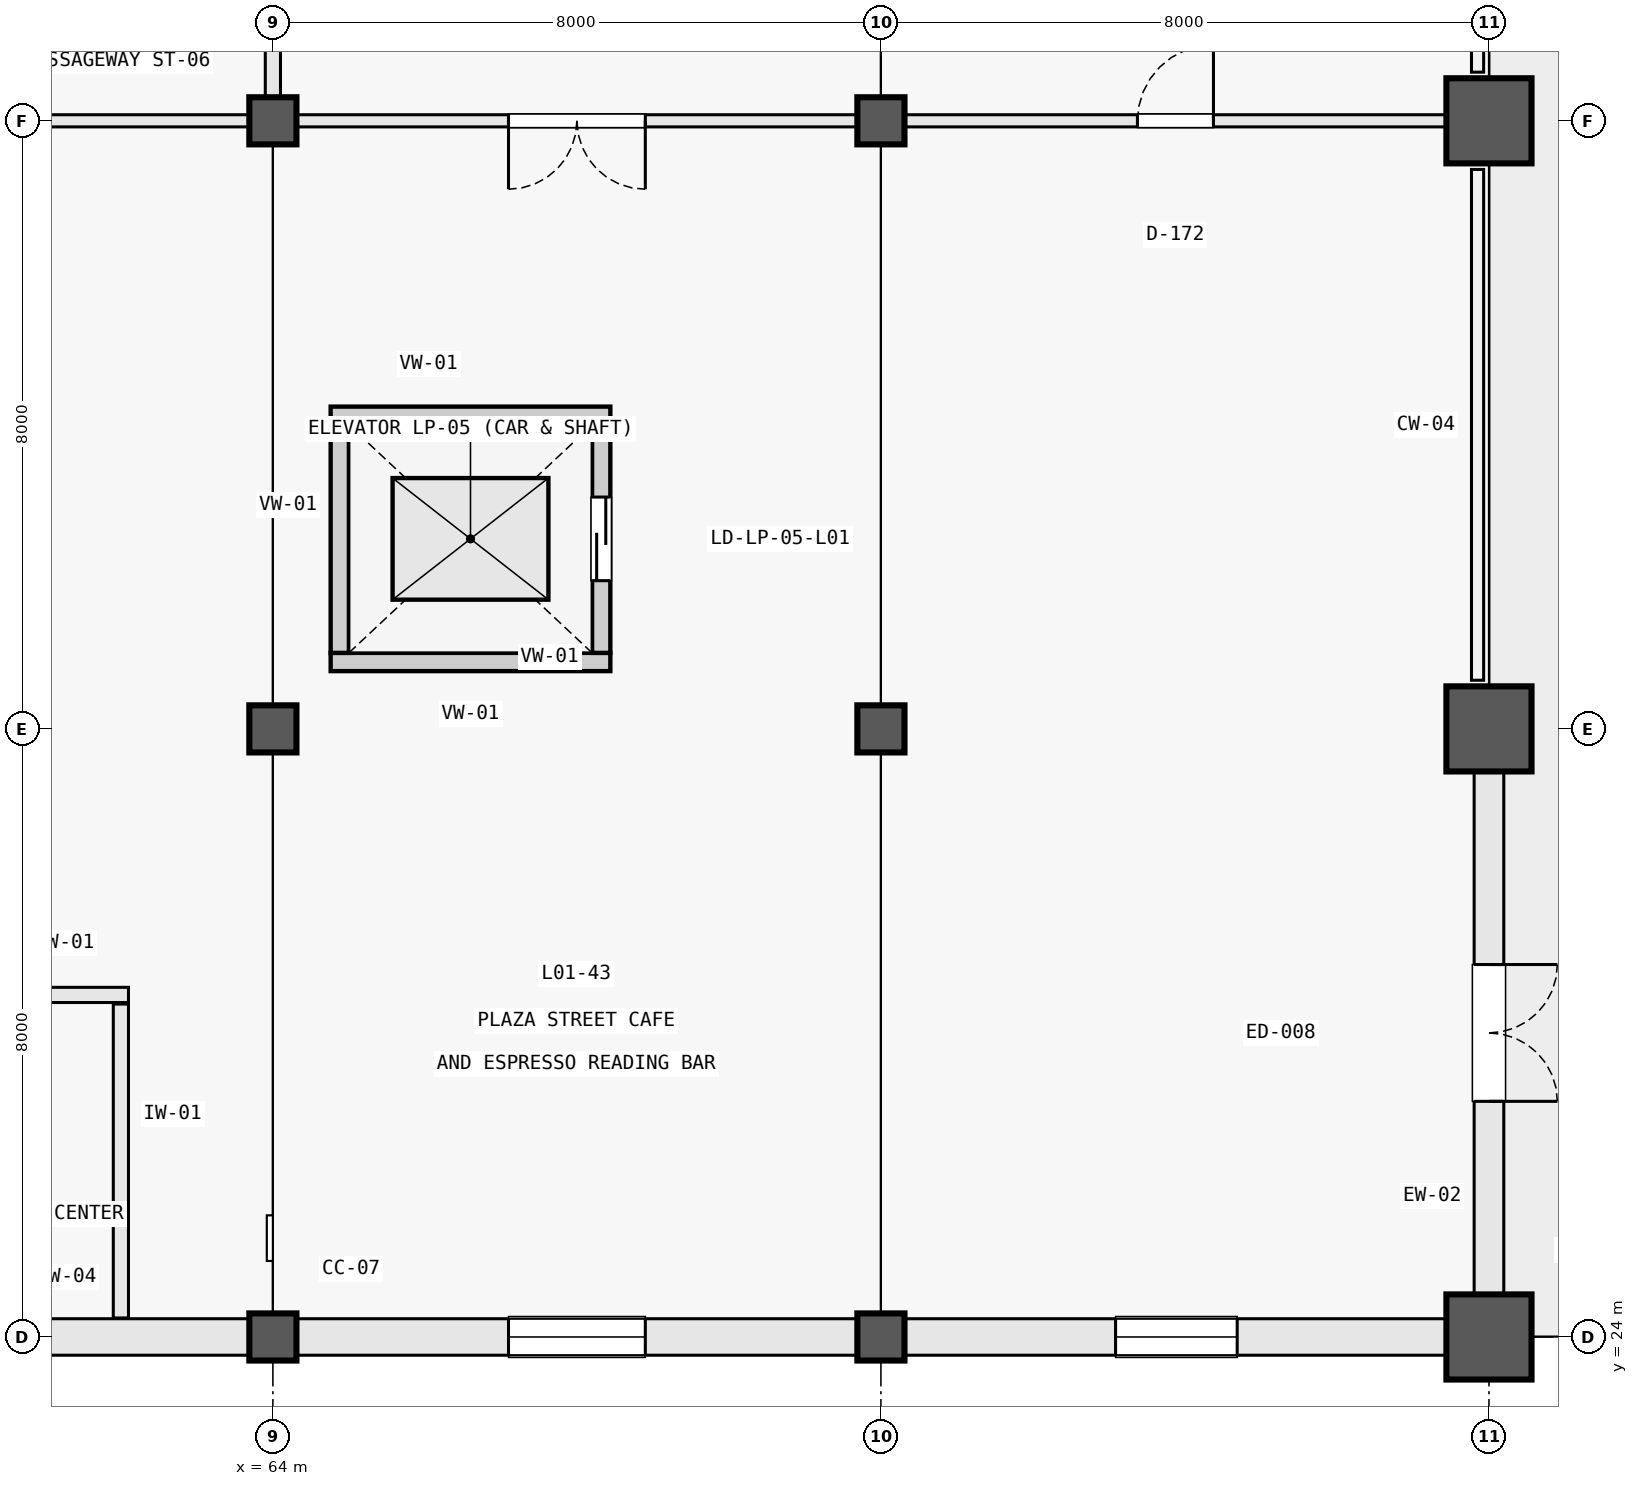
"""IFC4 building model, lengths in metres.
Left out: names, types, materials, properties, quantities, classifications, styles, units other than length and angle.
Written with IfcOpenShell. Run it as: python <this file> out.ifc"""

import sys

from ifc_helpers import new_model, si_unit, direction, frame, frame_2d, origin, origin_2d, place, context, subcontext, project, spatial, rectangle, circle, extrude, element, fill, save


model = new_model("IFC4")
c1 = context("Model", 3, precision=1e-05, world=origin(), true_north=direction((0.0, 1.0)))
c2 = subcontext(c1, "Body", "Model", "MODEL_VIEW")
j1 = project(units=[si_unit("LENGTHUNIT", "METRE"), si_unit("PLANEANGLEUNIT", "RADIAN")], contexts=[c1])
p1 = place(None, origin())
s1 = spatial("IfcSite", under=j1, at=p1, CompositionType="ELEMENT")
p2 = place(p1, origin())
s2 = spatial("IfcBuilding", under=s1, at=p2, CompositionType="ELEMENT")
p3 = place(p2, origin())
s3 = spatial("IfcBuildingStorey", under=s2, at=p3, CompositionType="ELEMENT", Elevation=0.0)
for number, where, z_axis, x_axis in (
    (1, (64.0, 24.0, 0.0), (0.0, 0.0, 1.0), (1.0, 0.0, 0.0)),
    (2, (64.0, 32.0, 0.0), (0.0, 0.0, 1.0), (1.0, 0.0, 0.0)),
    (3, (64.0, 40.0, 0.0), (0.0, 0.0, 1.0), (1.0, 0.0, 0.0)),
    (4, (72.0, 24.0, 0.0), (0.0, 0.0, 1.0), (1.0, 0.0, 0.0)),
    (5, (72.0, 32.0, 0.0), (0.0, 0.0, 1.0), (1.0, 0.0, 0.0)),
    (6, (72.0, 40.0, 0.0), (0.0, 0.0, 1.0), (1.0, 0.0, 0.0)),
):
    element("IfcColumn", number, at=place(p3, frame(where, z_axis=z_axis, x_axis=x_axis)), inside=s3, PredefinedType="COLUMN", context=c2, shape_type="SweptSolid", body=[
        extrude(circle(Radius=0.31, at=origin_2d()), origin(), (0.0, 0.0, 1.0), 5.4),
    ])
for number, where, z_axis, x_axis in (
    (7, (80.0, 24.0, 0.0), (0.0, 0.0, 1.0), (1.0, 0.0, 0.0)),
    (8, (80.0, 32.0, 0.0), (0.0, 0.0, 1.0), (1.0, 0.0, 0.0)),
    (9, (80.0, 40.0, 0.0), (0.0, 0.0, 1.0), (1.0, 0.0, 0.0)),
):
    element("IfcColumn", number, at=place(p3, frame(where, z_axis=z_axis, x_axis=x_axis)), inside=s3, PredefinedType="COLUMN", context=c2, shape_type="SweptSolid", body=[
        extrude(circle(Radius=0.56, at=origin_2d()), origin(), (0.0, 0.0, 1.0), 5.4),
    ])
p4 = place(p3, frame((80.0, 24.504, 0.0), z_axis=(0.0, 0.0, 1.0), x_axis=(0.0, 1.0, 0.0)))
e10 = element("IfcWall", 10, at=p4, inside=s3, PredefinedType="STANDARD", context=c2, shape_type="SweptSolid", body=[
    extrude(rectangle(XDim=6.992, YDim=0.39, at=frame_2d((3.496, 0.0))), origin(), (0.0, 0.0, 1.0), 3.91),
])
p5 = place(p4, frame((2.596, 0.0, 0.0)))
e11 = element("IfcOpeningElement", 11, at=p5, cuts=e10, PredefinedType="OPENING", context=c2, shape_type="SweptSolid", body=[
    extrude(rectangle(XDim=1.8, YDim=2.4, at=frame_2d((0.9, 1.2))), frame((0.0, 0.207, 0.0), z_axis=(0.0, -1.0, 0.0), x_axis=(1.0, 0.0, 0.0)), (0.0, 0.0, 1.0), 0.414),
])
p6 = place(p3, frame((56.279, 24.0, 0.0), z_axis=(0.0, 0.0, 1.0), x_axis=(1.0, 0.0, 0.0)))
e12 = element("IfcWall", 12, at=p6, inside=s3, PredefinedType="STANDARD", context=c2, shape_type="SweptSolid", body=[
    extrude(rectangle(XDim=7.442, YDim=0.48, at=frame_2d((3.721, 0.0))), origin(), (0.0, 0.0, 1.0), 3.91),
])
p7 = place(p6, frame((1.55, 0.0, 0.0)))
e13 = element("IfcOpeningElement", 13, at=p7, cuts=e12, PredefinedType="OPENING", context=c2, shape_type="SweptSolid", body=[
    extrude(rectangle(XDim=1.1, YDim=2.25, at=frame_2d((0.55, 1.125))), frame((0.0, 0.252, 0.0), z_axis=(0.0, -1.0, 0.0), x_axis=(1.0, 0.0, 0.0)), (0.0, 0.0, 1.0), 0.504),
])
p8 = place(p3, frame((64.279, 24.0, 0.0), z_axis=(0.0, 0.0, 1.0), x_axis=(1.0, 0.0, 0.0)))
e14 = element("IfcWall", 14, at=p8, inside=s3, PredefinedType="STANDARD", context=c2, shape_type="SweptSolid", body=[
    extrude(rectangle(XDim=7.442, YDim=0.48, at=frame_2d((3.721, 0.0))), origin(), (0.0, 0.0, 1.0), 3.91),
])
p9 = place(p8, frame((2.821, 0.0, 0.72)))
e15 = element("IfcOpeningElement", 15, at=p9, cuts=e14, PredefinedType="OPENING", context=c2, shape_type="SweptSolid", body=[
    extrude(rectangle(XDim=1.8, YDim=2.3, at=frame_2d((0.9, 1.15))), frame((0.0, 0.252, 0.0), z_axis=(0.0, -1.0, 0.0), x_axis=(1.0, 0.0, 0.0)), (0.0, 0.0, 1.0), 0.504),
])
p10 = place(p3, frame((72.279, 24.0, 0.0), z_axis=(0.0, 0.0, 1.0), x_axis=(1.0, 0.0, 0.0)))
e16 = element("IfcWall", 16, at=p10, inside=s3, PredefinedType="STANDARD", context=c2, shape_type="SweptSolid", body=[
    extrude(rectangle(XDim=7.217, YDim=0.48, at=frame_2d((3.608, 0.0))), origin(), (0.0, 0.0, 1.0), 3.91),
])
p11 = place(p10, frame((2.809, 0.0, 0.72)))
e17 = element("IfcOpeningElement", 17, at=p11, cuts=e16, PredefinedType="OPENING", context=c2, shape_type="SweptSolid", body=[
    extrude(rectangle(XDim=1.6, YDim=2.2, at=frame_2d((0.8, 1.1))), frame((0.0, 0.252, 0.0), z_axis=(0.0, -1.0, 0.0), x_axis=(1.0, 0.0, 0.0)), (0.0, 0.0, 1.0), 0.504),
])
for number, where, z_axis, x_axis in (
    (18, (64.76, 32.88, 0.0), (0.0, 0.0, 1.0), (1.0, 0.0, 0.0)),
    (19, (64.76, 36.12, 0.0), (0.0, 0.0, 1.0), (1.0, 0.0, 0.0)),
):
    element("IfcWall", number, at=place(p3, frame(where, z_axis=z_axis, x_axis=x_axis)), inside=s3, PredefinedType="SOLIDWALL", context=c2, shape_type="SweptSolid", body=[
        extrude(rectangle(XDim=3.68, YDim=0.24, at=frame_2d((1.84, 0.0))), origin(), (0.0, 0.0, 1.0), 5.4),
    ])
p12 = place(p3, frame((64.88, 33.0, 0.0), z_axis=(0.0, 0.0, 1.0), x_axis=(0.0, 1.0, 0.0)))
e20 = element("IfcWall", 20, at=p12, inside=s3, PredefinedType="SOLIDWALL", context=c2, shape_type="SweptSolid", body=[
    extrude(rectangle(XDim=3.0, YDim=0.24, at=frame_2d((1.5, 0.0))), origin(), (0.0, 0.0, 1.0), 5.4),
])
p13 = place(p3, frame((68.32, 33.0, 0.0), z_axis=(0.0, 0.0, 1.0), x_axis=(0.0, 1.0, 0.0)))
e21 = element("IfcWall", 21, at=p13, inside=s3, PredefinedType="SOLIDWALL", context=c2, shape_type="SweptSolid", body=[
    extrude(rectangle(XDim=3.0, YDim=0.24, at=frame_2d((1.5, 0.0))), origin(), (0.0, 0.0, 1.0), 5.4),
])
p14 = place(p13, frame((0.95, 0.0, 0.0)))
e22 = element("IfcOpeningElement", 22, at=p14, cuts=e21, PredefinedType="OPENING", context=c2, shape_type="SweptSolid", body=[
    extrude(rectangle(XDim=1.1, YDim=2.2, at=frame_2d((0.55, 1.1))), frame((0.0, 0.132, 0.0), z_axis=(0.0, -1.0, 0.0), x_axis=(1.0, 0.0, 0.0)), (0.0, 0.0, 1.0), 0.264),
])
p15 = place(p3, frame((64.0, 40.32, 0.0), z_axis=(0.0, 0.0, 1.0), x_axis=(0.0, 1.0, 0.0)))
e23 = element("IfcWall", 23, at=p15, inside=s3, PredefinedType="PARTITIONING", context=c2, shape_type="SweptSolid", body=[
    extrude(rectangle(XDim=7.4, YDim=0.2, at=frame_2d((3.7, 0.0))), origin(), (0.0, 0.0, 1.0), 3.88),
])
p16 = place(p15, frame((2.8, 0.0, 0.0)))
e24 = element("IfcOpeningElement", 24, at=p16, cuts=e23, PredefinedType="OPENING", context=c2, shape_type="SweptSolid", body=[
    extrude(rectangle(XDim=1.8, YDim=2.25, at=frame_2d((0.9, 1.125))), frame((0.0, 0.112, 0.0), z_axis=(0.0, -1.0, 0.0), x_axis=(1.0, 0.0, 0.0)), (0.0, 0.0, 1.0), 0.224),
])
p17 = place(p3, frame((56.25, 28.5, 0.0), z_axis=(0.0, 0.0, 1.0), x_axis=(1.0, 0.0, 0.0)))
e25 = element("IfcWall", 25, at=p17, inside=s3, PredefinedType="PARTITIONING", context=c2, shape_type="SweptSolid", body=[
    extrude(rectangle(XDim=5.85, YDim=0.2, at=frame_2d((2.925, 0.0))), origin(), (0.0, 0.0, 1.0), 3.88),
])
p18 = place(p17, frame((2.325, 0.0, 0.0)))
e26 = element("IfcOpeningElement", 26, at=p18, cuts=e25, PredefinedType="OPENING", context=c2, shape_type="SweptSolid", body=[
    extrude(rectangle(XDim=1.2, YDim=2.25, at=frame_2d((0.6, 1.125))), frame((0.0, 0.112, 0.0), z_axis=(0.0, -1.0, 0.0), x_axis=(1.0, 0.0, 0.0)), (0.0, 0.0, 1.0), 0.224),
])
p19 = place(p3, frame((62.0, 24.25, 0.0), z_axis=(0.0, 0.0, 1.0), x_axis=(0.0, 1.0, 0.0)))
e27 = element("IfcWall", 27, at=p19, inside=s3, PredefinedType="PARTITIONING", context=c2, shape_type="SweptSolid", body=[
    extrude(rectangle(XDim=4.13, YDim=0.2, at=frame_2d((2.065, 0.0))), origin(), (0.0, 0.0, 1.0), 3.88),
])
p20 = place(p3, frame((56.32, 40.0, 0.0), z_axis=(0.0, 0.0, 1.0), x_axis=(1.0, 0.0, 0.0)))
e28 = element("IfcWall", 28, at=p20, inside=s3, PredefinedType="PARTITIONING", context=c2, shape_type="SweptSolid", body=[
    extrude(rectangle(XDim=7.36, YDim=0.16, at=frame_2d((3.68, 0.0))), origin(), (0.0, 0.0, 1.0), 3.88),
])
p21 = place(p3, frame((64.32, 40.0, 0.0), z_axis=(0.0, 0.0, 1.0), x_axis=(1.0, 0.0, 0.0)))
e29 = element("IfcWall", 29, at=p21, inside=s3, PredefinedType="PARTITIONING", context=c2, shape_type="SweptSolid", body=[
    extrude(rectangle(XDim=7.36, YDim=0.16, at=frame_2d((3.68, 0.0))), origin(), (0.0, 0.0, 1.0), 3.88),
])
p22 = place(p21, frame((2.78, 0.0, 0.0)))
e30 = element("IfcOpeningElement", 30, at=p22, cuts=e29, PredefinedType="OPENING", context=c2, shape_type="SweptSolid", body=[
    extrude(rectangle(XDim=1.8, YDim=2.3, at=frame_2d((0.9, 1.15))), frame((0.0, 0.092, 0.0), z_axis=(0.0, -1.0, 0.0), x_axis=(1.0, 0.0, 0.0)), (0.0, 0.0, 1.0), 0.184),
])
p23 = place(p3, frame((72.32, 40.0, 0.0), z_axis=(0.0, 0.0, 1.0), x_axis=(1.0, 0.0, 0.0)))
e31 = element("IfcWall", 31, at=p23, inside=s3, PredefinedType="PARTITIONING", context=c2, shape_type="SweptSolid", body=[
    extrude(rectangle(XDim=7.11, YDim=0.16, at=frame_2d((3.555, 0.0))), origin(), (0.0, 0.0, 1.0), 3.88),
])
p24 = place(p23, frame((3.055, 0.0, 0.0)))
e32 = element("IfcOpeningElement", 32, at=p24, cuts=e31, PredefinedType="OPENING", context=c2, shape_type="SweptSolid", body=[
    extrude(rectangle(XDim=1.0, YDim=2.15, at=frame_2d((0.5, 1.075))), frame((0.0, 0.092, 0.0), z_axis=(0.0, -1.0, 0.0), x_axis=(1.0, 0.0, 0.0)), (0.0, 0.0, 1.0), 0.184),
])
p25 = place(p5, frame((1.8, 0.0, 0.0), z_axis=(0.0, 0.0, 1.0), x_axis=(-1.0, 0.0, 0.0)))
e33 = element("IfcDoor", 33, at=p25, inside=s3, OperationType="DOUBLE_DOOR_SINGLE_SWING", PredefinedType="DOOR", context=c2, shape_type="SweptSolid", body=[
    extrude(rectangle(XDim=1.8, YDim=2.4, at=frame_2d((0.9, 1.2))), frame((0.0, 0.025, 0.0), z_axis=(0.0, -1.0, 0.0), x_axis=(1.0, 0.0, 0.0)), (0.0, 0.0, 1.0), 0.05),
])
fill(e11, e33)
p26 = place(p9, origin())
e34 = element("IfcWindow", 34, at=p26, inside=s3, PartitioningType="SINGLE_PANEL", PredefinedType="WINDOW", context=c2, shape_type="SweptSolid", body=[
    extrude(rectangle(XDim=1.8, YDim=2.3, at=frame_2d((0.9, 1.15))), frame((0.0, 0.03, 0.0), z_axis=(0.0, -1.0, 0.0), x_axis=(1.0, 0.0, 0.0)), (0.0, 0.0, 1.0), 0.06),
])
fill(e15, e34)
p27 = place(p11, origin())
e35 = element("IfcWindow", 35, at=p27, inside=s3, PartitioningType="SINGLE_PANEL", PredefinedType="WINDOW", context=c2, shape_type="SweptSolid", body=[
    extrude(rectangle(XDim=1.6, YDim=2.2, at=frame_2d((0.8, 1.1))), frame((0.0, 0.03, 0.0), z_axis=(0.0, -1.0, 0.0), x_axis=(1.0, 0.0, 0.0)), (0.0, 0.0, 1.0), 0.06),
])
fill(e17, e35)
p28 = place(p14, origin())
e36 = element("IfcDoor", 36, at=p28, inside=s3, OperationType="DOUBLE_DOOR_SLIDING", PredefinedType="DOOR", context=c2, shape_type="SweptSolid", body=[
    extrude(rectangle(XDim=1.1, YDim=2.2, at=frame_2d((0.55, 1.1))), frame((0.0, 0.025, 0.0), z_axis=(0.0, -1.0, 0.0), x_axis=(1.0, 0.0, 0.0)), (0.0, 0.0, 1.0), 0.05),
])
fill(e22, e36)
p29 = place(p22, frame((1.8, 0.0, 0.0), z_axis=(0.0, 0.0, 1.0), x_axis=(-1.0, 0.0, 0.0)))
e37 = element("IfcDoor", 37, at=p29, inside=s3, OperationType="DOUBLE_DOOR_SINGLE_SWING", PredefinedType="DOOR", context=c2, shape_type="SweptSolid", body=[
    extrude(rectangle(XDim=1.8, YDim=2.3, at=frame_2d((0.9, 1.15))), frame((0.0, 0.025, 0.0), z_axis=(0.0, -1.0, 0.0), x_axis=(1.0, 0.0, 0.0)), (0.0, 0.0, 1.0), 0.05),
])
fill(e30, e37)
p30 = place(p24, origin())
e38 = element("IfcDoor", 38, at=p30, inside=s3, OperationType="SINGLE_SWING_RIGHT", PredefinedType="DOOR", context=c2, shape_type="SweptSolid", body=[
    extrude(rectangle(XDim=1.0, YDim=2.15, at=frame_2d((0.5, 1.075))), frame((0.0, 0.025, 0.0), z_axis=(0.0, -1.0, 0.0), x_axis=(1.0, 0.0, 0.0)), (0.0, 0.0, 1.0), 0.05),
])
fill(e32, e38)
save(model, sys.argv[1])
